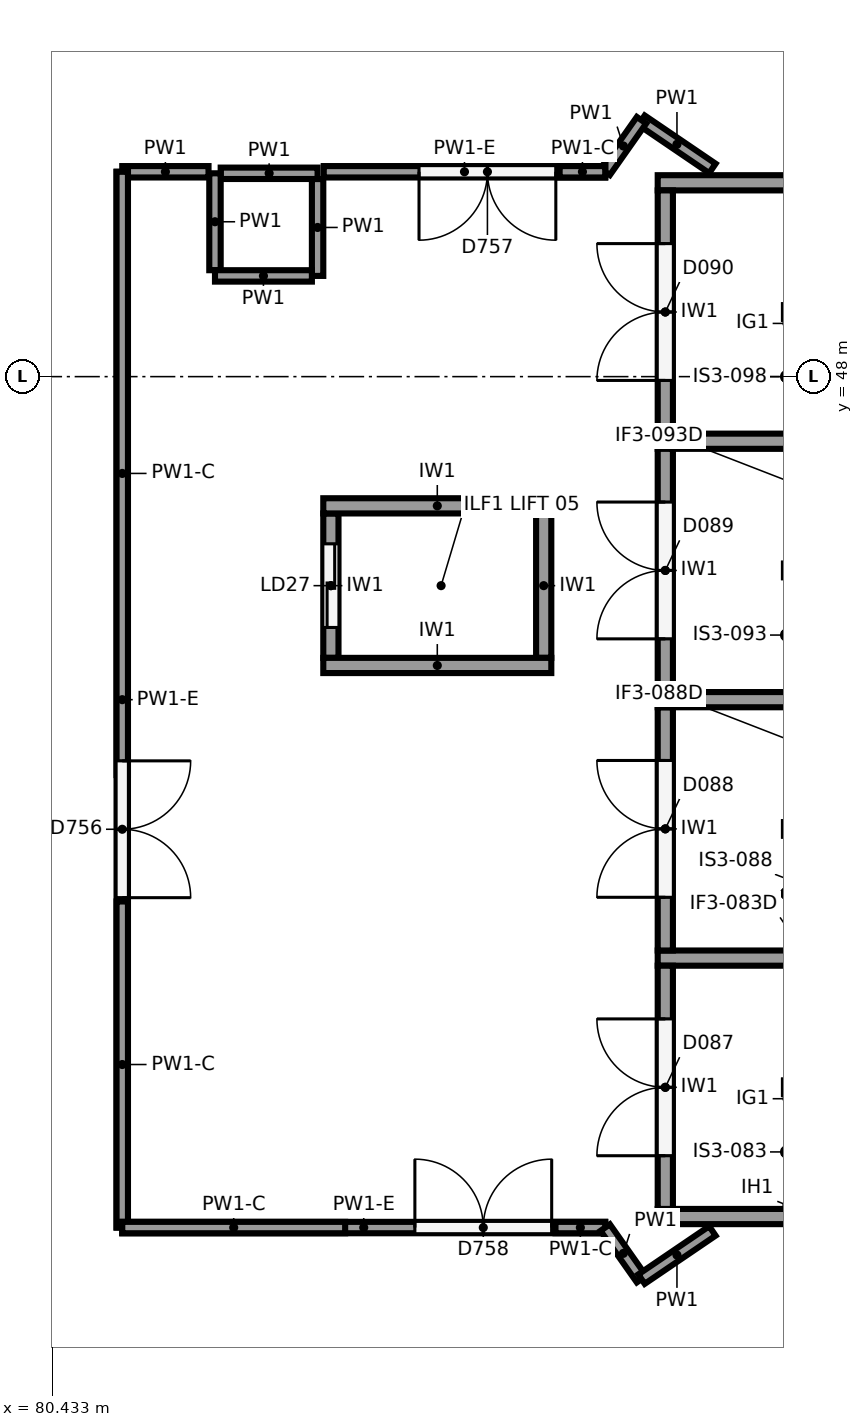
"""IFC4 building model, lengths in metres.
Left out: names, types, materials, properties, quantities, classifications, styles, units other than length and angle.
Written with IfcOpenShell. Run it as: python <this file> out.ifc"""

import sys

from ifc_helpers import new_model, si_unit, direction, frame, frame_2d, origin, origin_2d, place, context, subcontext, project, spatial, rectangle, circle, extrude, element, fill, save


model = new_model("IFC4")
c1 = context("Model", 3, precision=1e-05, world=origin(), true_north=direction((0.0, 1.0)))
c2 = subcontext(c1, "Body", "Model", "MODEL_VIEW")
j1 = project(units=[si_unit("LENGTHUNIT", "METRE"), si_unit("PLANEANGLEUNIT", "RADIAN")], contexts=[c1])
p1 = place(None, origin())
s1 = spatial("IfcSite", under=j1, at=p1, CompositionType="ELEMENT")
p2 = place(p1, origin())
s2 = spatial("IfcBuilding", under=s1, at=p2, CompositionType="ELEMENT")
p3 = place(p2, frame((0.0, 0.0, 6.5)))
s3 = spatial("IfcBuildingStorey", under=s2, at=p3, CompositionType="ELEMENT", Elevation=6.5)
p4 = place(p3, frame((84.884, 42.562, 0.0), z_axis=(0.0, 0.0, 1.0), x_axis=(1.0, 0.0, 0.0)))
e1 = element("IfcColumn", 1, at=p4, inside=s3, PredefinedType="COLUMN", context=c2, shape_type="SweptSolid", body=[
    extrude(circle(Radius=0.6, at=origin_2d()), origin(), (0.0, 0.0, 1.0), 5.5),
])
for number, where, z_axis, x_axis in (
    (2, (97.2, 36.95, 0.0), (0.0, 0.0, 1.0), (-1.0, 0.0, 0.0)),
    (3, (97.2, 43.75, 0.0), (0.0, 0.0, 1.0), (-1.0, 0.0, 0.0)),
    (4, (97.2, 50.55, 0.0), (0.0, 0.0, 1.0), (-1.0, 0.0, 0.0)),
    (5, (97.2, 40.35, 0.0), (0.0, 0.0, 1.0), (-1.0, 0.0, 0.0)),
    (6, (97.2, 47.15, 0.0), (0.0, 0.0, 1.0), (-1.0, 0.0, 0.0)),
):
    element("IfcWall", number, at=place(p3, frame(where, z_axis=z_axis, x_axis=x_axis)), inside=s3, PredefinedType="SHEAR", context=c2, shape_type="SweptSolid", body=[
        extrude(rectangle(XDim=8.8, YDim=0.2, at=frame_2d((4.4, 0.0))), origin(), (0.0, 0.0, 1.0), 5.15),
    ])
p5 = place(p3, frame((88.5, 37.05, 0.0), z_axis=(0.0, 0.0, 1.0), x_axis=(0.0, 1.0, 0.0)))
e7 = element("IfcWall", 7, at=p5, inside=s3, PredefinedType="SHEAR", context=c2, shape_type="SweptSolid", body=[
    extrude(rectangle(XDim=3.2, YDim=0.2, at=frame_2d((1.6, 0.0))), origin(), (0.0, 0.0, 1.0), 5.15),
])
p6 = place(p5, frame((0.7, 0.0, 0.0)))
e8 = element("IfcOpeningElement", 8, at=p6, cuts=e7, PredefinedType="OPENING", context=c2, shape_type="SweptSolid", body=[
    extrude(rectangle(XDim=1.8, YDim=2.1, at=frame_2d((0.9, 1.05))), frame((0.0, 0.11, 0.0), z_axis=(0.0, -1.0, 0.0), x_axis=(1.0, 0.0, 0.0)), (0.0, 0.0, 1.0), 0.22),
])
p7 = place(p3, frame((88.5, 40.45, 0.0), z_axis=(0.0, 0.0, 1.0), x_axis=(0.0, 1.0, 0.0)))
e9 = element("IfcWall", 9, at=p7, inside=s3, PredefinedType="SHEAR", context=c2, shape_type="SweptSolid", body=[
    extrude(rectangle(XDim=3.2, YDim=0.2, at=frame_2d((1.6, 0.0))), origin(), (0.0, 0.0, 1.0), 5.15),
])
p8 = place(p7, frame((0.7, 0.0, 0.0)))
e10 = element("IfcOpeningElement", 10, at=p8, cuts=e9, PredefinedType="OPENING", context=c2, shape_type="SweptSolid", body=[
    extrude(rectangle(XDim=1.8, YDim=2.1, at=frame_2d((0.9, 1.05))), frame((0.0, 0.11, 0.0), z_axis=(0.0, -1.0, 0.0), x_axis=(1.0, 0.0, 0.0)), (0.0, 0.0, 1.0), 0.22),
])
p9 = place(p3, frame((88.5, 43.85, 0.0), z_axis=(0.0, 0.0, 1.0), x_axis=(0.0, 1.0, 0.0)))
e11 = element("IfcWall", 11, at=p9, inside=s3, PredefinedType="SHEAR", context=c2, shape_type="SweptSolid", body=[
    extrude(rectangle(XDim=3.2, YDim=0.2, at=frame_2d((1.6, 0.0))), origin(), (0.0, 0.0, 1.0), 5.15),
])
p10 = place(p9, frame((0.7, 0.0, 0.0)))
e12 = element("IfcOpeningElement", 12, at=p10, cuts=e11, PredefinedType="OPENING", context=c2, shape_type="SweptSolid", body=[
    extrude(rectangle(XDim=1.8, YDim=2.1, at=frame_2d((0.9, 1.05))), frame((0.0, 0.11, 0.0), z_axis=(0.0, -1.0, 0.0), x_axis=(1.0, 0.0, 0.0)), (0.0, 0.0, 1.0), 0.22),
])
p11 = place(p3, frame((88.5, 47.25, 0.0), z_axis=(0.0, 0.0, 1.0), x_axis=(0.0, 1.0, 0.0)))
e13 = element("IfcWall", 13, at=p11, inside=s3, PredefinedType="SHEAR", context=c2, shape_type="SweptSolid", body=[
    extrude(rectangle(XDim=3.2, YDim=0.2, at=frame_2d((1.6, 0.0))), origin(), (0.0, 0.0, 1.0), 5.15),
])
p12 = place(p11, frame((0.7, 0.0, 0.0)))
e14 = element("IfcOpeningElement", 14, at=p12, cuts=e13, PredefinedType="OPENING", context=c2, shape_type="SweptSolid", body=[
    extrude(rectangle(XDim=1.8, YDim=2.1, at=frame_2d((0.9, 1.05))), frame((0.0, 0.11, 0.0), z_axis=(0.0, -1.0, 0.0), x_axis=(1.0, 0.0, 0.0)), (0.0, 0.0, 1.0), 0.22),
])
for number, where, z_axis, x_axis in (
    (15, (87.0, 44.2, 0.0), (0.0, 0.0, 1.0), (-1.0, 0.0, 0.0)),
    (16, (87.0, 46.3, 0.0), (0.0, 0.0, 1.0), (-1.0, 0.0, 0.0)),
):
    element("IfcWall", number, at=place(p3, frame(where, z_axis=z_axis, x_axis=x_axis)), inside=s3, PredefinedType="SHEAR", context=c2, shape_type="SweptSolid", body=[
        extrude(rectangle(XDim=3.0, YDim=0.2, at=frame_2d((1.5, 0.0))), origin(), (0.0, 0.0, 1.0), 5.15),
    ])
p13 = place(p3, frame((86.9, 44.3, 0.0), z_axis=(0.0, 0.0, 1.0), x_axis=(0.0, 1.0, 0.0)))
e17 = element("IfcWall", 17, at=p13, inside=s3, PredefinedType="SHEAR", context=c2, shape_type="SweptSolid", body=[
    extrude(rectangle(XDim=1.9, YDim=0.2, at=frame_2d((0.95, 0.0))), origin(), (0.0, 0.0, 1.0), 5.15),
])
p14 = place(p3, frame((84.1, 44.3, 0.0), z_axis=(0.0, 0.0, 1.0), x_axis=(0.0, 1.0, 0.0)))
e18 = element("IfcWall", 18, at=p14, inside=s3, PredefinedType="SHEAR", context=c2, shape_type="SweptSolid", body=[
    extrude(rectangle(XDim=1.9, YDim=0.2, at=frame_2d((0.95, 0.0))), origin(), (0.0, 0.0, 1.0), 5.15),
])
p15 = place(p14, frame((0.4, 0.0, 0.0)))
e19 = element("IfcOpeningElement", 19, at=p15, cuts=e18, PredefinedType="OPENING", context=c2, shape_type="SweptSolid", body=[
    extrude(rectangle(XDim=1.1, YDim=2.1, at=frame_2d((0.55, 1.05))), frame((0.0, 0.11, 0.0), z_axis=(0.0, -1.0, 0.0), x_axis=(1.0, 0.0, 0.0)), (0.0, 0.0, 1.0), 0.22),
])
for number, where, z_axis, x_axis in (
    (20, (83.925, 49.325, 0.0), (0.0, 0.0, 1.0), (0.0, 1.0, 0.0)),
    (21, (83.925, 50.675, 0.0), (0.0, 0.0, 1.0), (-1.0, 0.0, 0.0)),
    (22, (82.575, 50.675, 0.0), (0.0, 0.0, 1.0), (0.0, -1.0, 0.0)),
    (23, (82.575, 49.325, 0.0), (0.0, 0.0, 1.0), (1.0, 0.0, 0.0)),
):
    element("IfcWall", number, at=place(p3, frame(where, z_axis=z_axis, x_axis=x_axis)), inside=s3, PredefinedType="PARTITIONING", context=c2, shape_type="SweptSolid", body=[
        extrude(rectangle(XDim=1.275, YDim=0.15, at=frame_2d((0.638, 0.0))), origin(), (0.0, 0.0, 1.0), 5.15),
    ])
p16 = place(p3, frame((82.49, 50.695, 0.0), z_axis=(0.0, 0.0, 1.0), x_axis=(-1.0, 0.0, 0.0)))
e24 = element("IfcWall", 24, at=p16, inside=s3, PredefinedType="PARTITIONING", context=c2, shape_type="SweptSolid", body=[
    extrude(rectangle(XDim=1.135, YDim=0.15, at=frame_2d((0.567, 0.0))), origin(), (0.0, 0.0, 1.0), 5.15),
])
p17 = place(p3, frame((81.355, 50.695, 0.0), z_axis=(0.0, 0.0, 1.0), x_axis=(0.0, -1.0, 0.0)))
e25 = element("IfcWall", 25, at=p17, inside=s3, PredefinedType="PARTITIONING", context=c2, shape_type="SweptSolid", body=[
    extrude(rectangle(XDim=13.89, YDim=0.15, at=frame_2d((6.945, 0.0))), origin(), (0.0, 0.0, 1.0), 4.05),
])
p18 = place(p17, frame((7.75, 0.0, 0.0)))
e26 = element("IfcOpeningElement", 26, at=p18, cuts=e25, PredefinedType="OPENING", context=c2, shape_type="SweptSolid", body=[
    extrude(rectangle(XDim=1.8, YDim=2.1, at=frame_2d((0.9, 1.05))), frame((0.0, 0.085, 0.0), z_axis=(0.0, -1.0, 0.0), x_axis=(1.0, 0.0, 0.0)), (0.0, 0.0, 1.0), 0.17),
])
p19 = place(p3, frame((81.355, 50.695, 4.05), z_axis=(0.0, 0.0, 1.0), x_axis=(0.0, -1.0, 0.0)))
e27 = element("IfcWall", 27, at=p19, inside=s3, PredefinedType="PARTITIONING", context=c2, shape_type="SweptSolid", body=[
    extrude(rectangle(XDim=7.937, YDim=0.15, at=frame_2d((3.969, 0.0))), origin(), (0.0, 0.0, 1.0), 1.1),
])
p20 = place(p3, frame((81.355, 41.095, 4.05), z_axis=(0.0, 0.0, 1.0), x_axis=(0.0, -1.0, 0.0)))
e28 = element("IfcWall", 28, at=p20, inside=s3, PredefinedType="PARTITIONING", context=c2, shape_type="SweptSolid", body=[
    extrude(rectangle(XDim=4.29, YDim=0.15, at=frame_2d((2.145, 0.0))), origin(), (0.0, 0.0, 1.0), 1.1),
])
p21 = place(p3, frame((81.355, 36.805, 0.0), z_axis=(0.0, 0.0, 1.0), x_axis=(1.0, 0.0, 0.0)))
e29 = element("IfcWall", 29, at=p21, inside=s3, PredefinedType="PARTITIONING", context=c2, shape_type="SweptSolid", body=[
    extrude(rectangle(XDim=6.354, YDim=0.15, at=frame_2d((3.177, 0.0))), origin(), (0.0, 0.0, 1.0), 4.05),
])
p22 = place(p21, frame((3.85, 0.0, 0.0)))
e30 = element("IfcOpeningElement", 30, at=p22, cuts=e29, PredefinedType="OPENING", context=c2, shape_type="SweptSolid", body=[
    extrude(rectangle(XDim=1.8, YDim=2.1, at=frame_2d((0.9, 1.05))), frame((0.0, 0.085, 0.0), z_axis=(0.0, -1.0, 0.0), x_axis=(1.0, 0.0, 0.0)), (0.0, 0.0, 1.0), 0.17),
])
p23 = place(p3, frame((81.355, 36.805, 4.05), z_axis=(0.0, 0.0, 1.0), x_axis=(1.0, 0.0, 0.0)))
e31 = element("IfcWall", 31, at=p23, inside=s3, PredefinedType="PARTITIONING", context=c2, shape_type="SweptSolid", body=[
    extrude(rectangle(XDim=2.933, YDim=0.15, at=frame_2d((1.466, 0.0))), origin(), (0.0, 0.0, 1.0), 1.1),
])
p24 = place(p3, frame((87.055, 36.805, 4.05), z_axis=(0.0, 0.0, 1.0), x_axis=(1.0, 0.0, 0.0)))
e32 = element("IfcWall", 32, at=p24, inside=s3, PredefinedType="PARTITIONING", context=c2, shape_type="SweptSolid", body=[
    extrude(rectangle(XDim=0.654, YDim=0.15, at=frame_2d((0.327, 0.0))), origin(), (0.0, 0.0, 1.0), 1.1),
])
p25 = place(p3, frame((87.709, 36.805, 0.0), z_axis=(0.0, 0.0, 1.0), x_axis=(0.575573582652, -0.81774999294, 0.0)))
e33 = element("IfcWall", 33, at=p25, inside=s3, PredefinedType="PARTITIONING", context=c2, shape_type="SweptSolid", body=[
    extrude(rectangle(XDim=0.83, YDim=0.15, at=frame_2d((0.415, 0.0))), origin(), (0.0, 0.0, 1.0), 5.15),
])
for number, where, z_axis, x_axis in (
    (34, (88.187, 36.126, 0.0), (0.0, 0.0, 1.0), (0.827, 0.562, 0.0)),
    (35, (89.12, 50.74, 0.0), (0.0, 0.0, 1.0), (-0.827, 0.562, 0.0)),
):
    element("IfcWall", number, at=place(p3, frame(where, z_axis=z_axis, x_axis=x_axis)), inside=s3, PredefinedType="PARTITIONING", context=c2, shape_type="SweptSolid", body=[
        extrude(rectangle(XDim=1.128, YDim=0.15, at=frame_2d((0.564, 0.0))), origin(), (0.0, 0.0, 1.0), 5.15),
    ])
p26 = place(p3, frame((88.187, 51.374, 0.0), z_axis=(0.0, 0.0, 1.0), x_axis=(-0.575376756214, -0.817888493872, 0.0)))
e36 = element("IfcWall", 36, at=p26, inside=s3, PredefinedType="PARTITIONING", context=c2, shape_type="SweptSolid", body=[
    extrude(rectangle(XDim=0.83, YDim=0.15, at=frame_2d((0.415, 0.0))), origin(), (0.0, 0.0, 1.0), 5.15),
])
p27 = place(p3, frame((87.709, 50.695, 0.0), z_axis=(0.0, 0.0, 1.0), x_axis=(-1.0, 0.0, 0.0)))
e37 = element("IfcWall", 37, at=p27, inside=s3, PredefinedType="PARTITIONING", context=c2, shape_type="SweptSolid", body=[
    extrude(rectangle(XDim=3.704, YDim=0.15, at=frame_2d((1.852, 0.0))), origin(), (0.0, 0.0, 1.0), 4.05),
])
p28 = place(p27, frame((0.65, 0.0, 0.0)))
e38 = element("IfcOpeningElement", 38, at=p28, cuts=e37, PredefinedType="OPENING", context=c2, shape_type="SweptSolid", body=[
    extrude(rectangle(XDim=1.8, YDim=2.1, at=frame_2d((0.9, 1.05))), frame((0.0, 0.085, 0.0), z_axis=(0.0, -1.0, 0.0), x_axis=(1.0, 0.0, 0.0)), (0.0, 0.0, 1.0), 0.17),
])
p29 = place(p3, frame((87.709, 50.695, 4.05), z_axis=(0.0, 0.0, 1.0), x_axis=(-1.0, 0.0, 0.0)))
e39 = element("IfcWall", 39, at=p29, inside=s3, PredefinedType="PARTITIONING", context=c2, shape_type="SweptSolid", body=[
    extrude(rectangle(XDim=0.6, YDim=0.15, at=frame_2d((0.3, 0.0))), origin(), (0.0, 0.0, 1.0), 1.1),
])
p30 = place(p6, origin())
e40 = element("IfcDoor", 40, at=p30, inside=s3, OperationType="DOUBLE_DOOR_SINGLE_SWING", PredefinedType="DOOR", context=c2, shape_type="SweptSolid", body=[
    extrude(rectangle(XDim=1.8, YDim=2.1, at=frame_2d((0.9, 1.05))), frame((0.0, 0.025, 0.0), z_axis=(0.0, -1.0, 0.0), x_axis=(1.0, 0.0, 0.0)), (0.0, 0.0, 1.0), 0.05),
])
fill(e8, e40)
p31 = place(p8, origin())
e41 = element("IfcDoor", 41, at=p31, inside=s3, OperationType="DOUBLE_DOOR_SINGLE_SWING", PredefinedType="DOOR", context=c2, shape_type="SweptSolid", body=[
    extrude(rectangle(XDim=1.8, YDim=2.1, at=frame_2d((0.9, 1.05))), frame((0.0, 0.025, 0.0), z_axis=(0.0, -1.0, 0.0), x_axis=(1.0, 0.0, 0.0)), (0.0, 0.0, 1.0), 0.05),
])
fill(e10, e41)
p32 = place(p10, origin())
e42 = element("IfcDoor", 42, at=p32, inside=s3, OperationType="DOUBLE_DOOR_SINGLE_SWING", PredefinedType="DOOR", context=c2, shape_type="SweptSolid", body=[
    extrude(rectangle(XDim=1.8, YDim=2.1, at=frame_2d((0.9, 1.05))), frame((0.0, 0.025, 0.0), z_axis=(0.0, -1.0, 0.0), x_axis=(1.0, 0.0, 0.0)), (0.0, 0.0, 1.0), 0.05),
])
fill(e12, e42)
p33 = place(p12, origin())
e43 = element("IfcDoor", 43, at=p33, inside=s3, OperationType="DOUBLE_DOOR_SINGLE_SWING", PredefinedType="DOOR", context=c2, shape_type="SweptSolid", body=[
    extrude(rectangle(XDim=1.8, YDim=2.1, at=frame_2d((0.9, 1.05))), frame((0.0, 0.025, 0.0), z_axis=(0.0, -1.0, 0.0), x_axis=(1.0, 0.0, 0.0)), (0.0, 0.0, 1.0), 0.05),
])
fill(e14, e43)
p34 = place(p15, origin())
e44 = element("IfcDoor", 44, at=p34, inside=s3, OperationType="SLIDING_TO_LEFT", PredefinedType="DOOR", context=c2, shape_type="SweptSolid", body=[
    extrude(rectangle(XDim=1.1, YDim=2.1, at=frame_2d((0.55, 1.05))), frame((0.0, 0.025, 0.0), z_axis=(0.0, -1.0, 0.0), x_axis=(1.0, 0.0, 0.0)), (0.0, 0.0, 1.0), 0.05),
])
fill(e19, e44)
p35 = place(p18, origin())
e45 = element("IfcDoor", 45, at=p35, inside=s3, OperationType="DOUBLE_DOOR_SINGLE_SWING", PredefinedType="DOOR", context=c2, shape_type="SweptSolid", body=[
    extrude(rectangle(XDim=1.8, YDim=2.1, at=frame_2d((0.9, 1.05))), frame((0.0, 0.025, 0.0), z_axis=(0.0, -1.0, 0.0), x_axis=(1.0, 0.0, 0.0)), (0.0, 0.0, 1.0), 0.05),
])
fill(e26, e45)
p36 = place(p28, origin())
e46 = element("IfcDoor", 46, at=p36, inside=s3, OperationType="DOUBLE_DOOR_SINGLE_SWING", PredefinedType="DOOR", context=c2, shape_type="SweptSolid", body=[
    extrude(rectangle(XDim=1.8, YDim=2.1, at=frame_2d((0.9, 1.05))), frame((0.0, 0.025, 0.0), z_axis=(0.0, -1.0, 0.0), x_axis=(1.0, 0.0, 0.0)), (0.0, 0.0, 1.0), 0.05),
])
fill(e38, e46)
p37 = place(p22, origin())
e47 = element("IfcDoor", 47, at=p37, inside=s3, OperationType="DOUBLE_DOOR_SINGLE_SWING", PredefinedType="DOOR", context=c2, shape_type="SweptSolid", body=[
    extrude(rectangle(XDim=1.8, YDim=2.1, at=frame_2d((0.9, 1.05))), frame((0.0, 0.025, 0.0), z_axis=(0.0, -1.0, 0.0), x_axis=(1.0, 0.0, 0.0)), (0.0, 0.0, 1.0), 0.05),
])
fill(e30, e47)
save(model, sys.argv[1])
